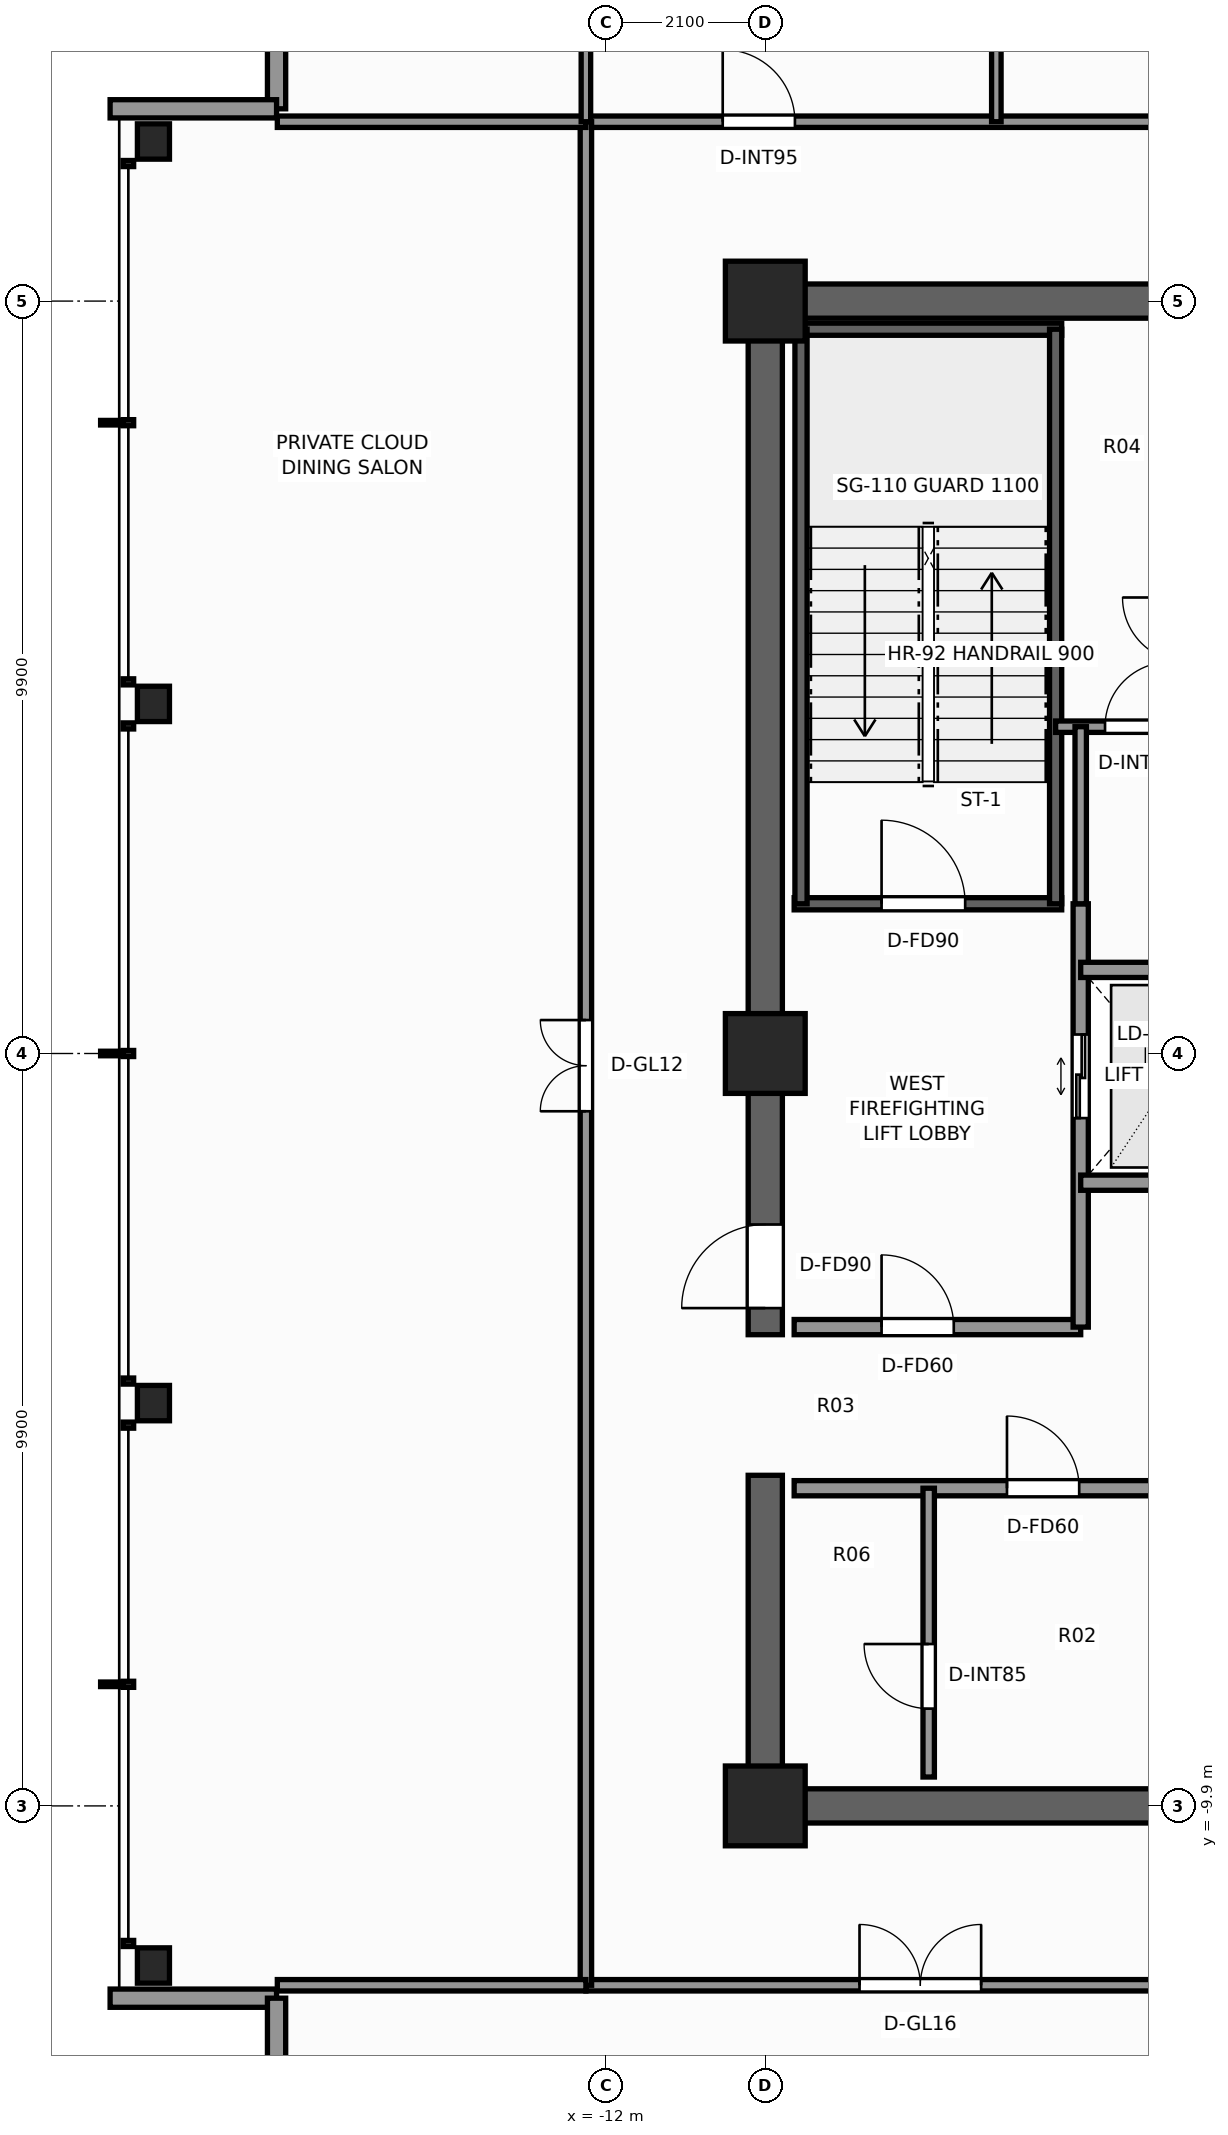
"""IFC4 building model, lengths in metres.
Left out: names, types, materials, properties, quantities, classifications, styles, units other than length and angle.
Written with IfcOpenShell. Run it as: python <this file> out.ifc"""

import sys

from ifc_helpers import new_model, si_unit, direction, frame, frame_2d, origin, origin_2d, place, context, subcontext, project, spatial, rectangle, i_section, extrude, element, fill, save


model = new_model("IFC4")
c1 = context("Model", 3, precision=1e-05, world=origin(), true_north=direction((0.0, 1.0)))
c2 = subcontext(c1, "Body", "Model", "MODEL_VIEW")
j1 = project(units=[si_unit("LENGTHUNIT", "METRE"), si_unit("PLANEANGLEUNIT", "RADIAN")], contexts=[c1])
p1 = place(None, origin())
s1 = spatial("IfcSite", under=j1, at=p1, CompositionType="ELEMENT")
p2 = place(p1, origin())
s2 = spatial("IfcBuilding", under=s1, at=p2, CompositionType="ELEMENT")
p3 = place(p2, frame((0.0, 0.0, 258.4)))
s3 = spatial("IfcBuildingStorey", under=s2, at=p3, CompositionType="ELEMENT", Elevation=258.4)
p4 = place(p3, frame((-3.54, -9.9, 0.0), z_axis=(0.0, 0.0, 1.0), x_axis=(-1.0, 0.0, 0.0)))
e1 = element("IfcWall", 1, at=p4, inside=s3, PredefinedType="SHEAR", context=c2, shape_type="SweptSolid", body=[
    extrude(rectangle(XDim=6.585, YDim=0.45, at=frame_2d((3.292, 0.0))), origin(), (0.0, 0.0, 1.0), 4.4),
])
p5 = place(p3, frame((-10.125, 9.9, 0.0), z_axis=(0.0, 0.0, 1.0), x_axis=(1.0, 0.0, 0.0)))
e2 = element("IfcWall", 2, at=p5, inside=s3, PredefinedType="SHEAR", context=c2, shape_type="SweptSolid", body=[
    extrude(rectangle(XDim=14.545, YDim=0.45, at=frame_2d((7.272, 0.0))), origin(), (0.0, 0.0, 1.0), 4.4),
])
p6 = place(p3, frame((-9.9, -9.675, 0.0), z_axis=(0.0, 0.0, 1.0), x_axis=(0.0, 1.0, 0.0)))
e3 = element("IfcWall", 3, at=p6, inside=s3, PredefinedType="SHEAR", context=c2, shape_type="SweptSolid", body=[
    extrude(rectangle(XDim=4.125, YDim=0.45, at=frame_2d((2.062, 0.0))), origin(), (0.0, 0.0, 1.0), 4.4),
])
p7 = place(p3, frame((-9.9, -3.7, 0.0), z_axis=(0.0, 0.0, 1.0), x_axis=(0.0, 1.0, 0.0)))
e4 = element("IfcWall", 4, at=p7, inside=s3, PredefinedType="SHEAR", context=c2, shape_type="SweptSolid", body=[
    extrude(rectangle(XDim=13.375, YDim=0.45, at=frame_2d((6.688, 0.0))), origin(), (0.0, 0.0, 1.0), 4.4),
])
p8 = place(p7, frame((0.35, 0.0, 0.0)))
e5 = element("IfcOpeningElement", 5, at=p8, cuts=e4, PredefinedType="OPENING", context=c2, shape_type="SweptSolid", body=[
    extrude(rectangle(XDim=1.1, YDim=2.2, at=frame_2d((0.55, 1.1))), frame((0.0, 0.235, 0.0), z_axis=(0.0, -1.0, 0.0), x_axis=(1.0, 0.0, 0.0)), (0.0, 0.0, 1.0), 0.47),
])
for number, where, z_axis, x_axis in (
    (6, (-9.9, -9.9, 0.0), (0.0, 0.0, 1.0), (1.0, 0.0, 0.0)),
    (7, (-9.9, 9.9, 0.0), (0.0, 0.0, 1.0), (1.0, 0.0, 0.0)),
    (8, (-9.9, 0.0, 0.0), (0.0, 0.0, 1.0), (1.0, 0.0, 0.0)),
):
    element("IfcColumn", number, at=place(p3, frame(where, z_axis=z_axis, x_axis=x_axis)), inside=s3, PredefinedType="COLUMN", context=c2, shape_type="SweptSolid", body=[
        extrude(rectangle(XDim=1.05, YDim=1.05, at=origin_2d()), origin(), (0.0, 0.0, 1.0), 4.4),
    ])
for number, where, z_axis, x_axis in (
    (9, (-17.95, -12.0, 0.0), (0.0, 0.0, 1.0), (1.0, 0.0, 0.0)),
    (10, (-17.95, -4.6, 0.0), (0.0, 0.0, 1.0), (1.0, 0.0, 0.0)),
    (11, (-17.95, 4.6, 0.0), (0.0, 0.0, 1.0), (1.0, 0.0, 0.0)),
    (12, (-17.95, 12.0, 0.0), (0.0, 0.0, 1.0), (1.0, 0.0, 0.0)),
):
    element("IfcColumn", number, at=place(p3, frame(where, z_axis=z_axis, x_axis=x_axis)), inside=s3, PredefinedType="COLUMN", context=c2, shape_type="SweptSolid", body=[
        extrude(i_section(OverallWidth=0.422, OverallDepth=0.465, WebThickness=0.045, FlangeThickness=0.073, FilletRadius=0.025, at=origin_2d()), origin(), (0.0, 0.0, 1.0), 4.4),
    ])
p9 = place(p3, frame((-16.33, 12.43, 0.0), z_axis=(0.0, 0.0, 1.0), x_axis=(0.0, 1.0, 0.0)))
e13 = element("IfcWall", 13, at=p9, inside=s3, PredefinedType="STANDARD", context=c2, shape_type="SweptSolid", body=[
    extrude(rectangle(XDim=2.19, YDim=0.24, at=frame_2d((1.095, 0.0))), origin(), (0.0, 0.0, 1.0), 3.503),
])
for number, where, z_axis, x_axis in (
    (14, (-18.52, 12.43, 0.0), (0.0, 0.0, 1.0), (1.0, 0.0, 0.0)),
    (15, (-16.33, -12.43, 0.0), (0.0, 0.0, 1.0), (-1.0, 0.0, 0.0)),
):
    element("IfcWall", number, at=place(p3, frame(where, z_axis=z_axis, x_axis=x_axis)), inside=s3, PredefinedType="STANDARD", context=c2, shape_type="SweptSolid", body=[
        extrude(rectangle(XDim=2.19, YDim=0.24, at=frame_2d((1.095, 0.0))), origin(), (0.0, 0.0, 1.0), 3.503),
    ])
p10 = place(p3, frame((-16.33, -14.62, 0.0), z_axis=(0.0, 0.0, 1.0), x_axis=(0.0, 1.0, 0.0)))
e16 = element("IfcWall", 16, at=p10, inside=s3, PredefinedType="STANDARD", context=c2, shape_type="SweptSolid", body=[
    extrude(rectangle(XDim=2.19, YDim=0.24, at=frame_2d((1.095, 0.0))), origin(), (0.0, 0.0, 1.0), 3.503),
])
p11 = place(p3, frame((-9.52, 1.97, 0.0), z_axis=(0.0, 0.0, 1.0), x_axis=(1.0, 0.0, 0.0)))
e17 = element("IfcWall", 17, at=p11, inside=s3, PredefinedType="SHEAR", context=c2, shape_type="SweptSolid", body=[
    extrude(rectangle(XDim=3.52, YDim=0.16, at=frame_2d((1.76, 0.0))), origin(), (0.0, 0.0, 1.0), 4.4),
])
p12 = place(p11, frame((1.15, 0.0, 0.0)))
e18 = element("IfcOpeningElement", 18, at=p12, cuts=e17, PredefinedType="OPENING", context=c2, shape_type="SweptSolid", body=[
    extrude(rectangle(XDim=1.1, YDim=2.2, at=frame_2d((0.55, 1.1))), frame((0.0, 0.09, 0.0), z_axis=(0.0, -1.0, 0.0), x_axis=(1.0, 0.0, 0.0)), (0.0, 0.0, 1.0), 0.18),
])
p13 = place(p3, frame((-9.52, 9.53, 0.0), z_axis=(0.0, 0.0, 1.0), x_axis=(1.0, 0.0, 0.0)))
e19 = element("IfcWall", 19, at=p13, inside=s3, PredefinedType="SHEAR", context=c2, shape_type="SweptSolid", body=[
    extrude(rectangle(XDim=3.52, YDim=0.16, at=frame_2d((1.76, 0.0))), origin(), (0.0, 0.0, 1.0), 4.4),
])
for number, where, z_axis, x_axis in (
    (20, (-9.43, 1.97, 0.0), (0.0, 0.0, 1.0), (0.0, 1.0, 0.0)),
    (21, (-6.08, 1.97, 0.0), (0.0, 0.0, 1.0), (0.0, 1.0, 0.0)),
):
    element("IfcWall", number, at=place(p3, frame(where, z_axis=z_axis, x_axis=x_axis)), inside=s3, PredefinedType="SHEAR", context=c2, shape_type="SweptSolid", body=[
        extrude(rectangle(XDim=7.56, YDim=0.16, at=frame_2d((3.78, 0.0))), origin(), (0.0, 0.0, 1.0), 4.4),
    ])
p14 = place(p3, frame((-9.52, -3.6, 0.0), z_axis=(0.0, 0.0, 1.0), x_axis=(1.0, 0.0, 0.0)))
e22 = element("IfcWall", 22, at=p14, inside=s3, PredefinedType="SOLIDWALL", context=c2, shape_type="SweptSolid", body=[
    extrude(rectangle(XDim=3.77, YDim=0.2, at=frame_2d((1.885, 0.0))), origin(), (0.0, 0.0, 1.0), 4.12),
])
p15 = place(p14, frame((1.15, 0.0, 0.0)))
e23 = element("IfcOpeningElement", 23, at=p15, cuts=e22, PredefinedType="OPENING", context=c2, shape_type="SweptSolid", body=[
    extrude(rectangle(XDim=0.95, YDim=2.06, at=frame_2d((0.475, 1.03))), frame((0.0, 0.11, 0.0), z_axis=(0.0, -1.0, 0.0), x_axis=(1.0, 0.0, 0.0)), (0.0, 0.0, 1.0), 0.22),
])
p16 = place(p3, frame((-5.75, -3.6, 0.0), z_axis=(0.0, 0.0, 1.0), x_axis=(0.0, 1.0, 0.0)))
e24 = element("IfcWall", 24, at=p16, inside=s3, PredefinedType="SOLIDWALL", context=c2, shape_type="SweptSolid", body=[
    extrude(rectangle(XDim=5.57, YDim=0.2, at=frame_2d((2.785, 0.0))), origin(), (0.0, 0.0, 1.0), 4.12),
])
p17 = place(p16, frame((2.75, 0.0, 0.0)))
e25 = element("IfcOpeningElement", 25, at=p17, cuts=e24, PredefinedType="OPENING", context=c2, shape_type="SweptSolid", body=[
    extrude(rectangle(XDim=1.1, YDim=2.2, at=frame_2d((0.55, 1.1))), frame((0.0, 0.11, 0.0), z_axis=(0.0, -1.0, 0.0), x_axis=(1.0, 0.0, 0.0)), (0.0, 0.0, 1.0), 0.22),
])
for number, where, z_axis, x_axis in (
    (26, (-5.75, -1.7, 0.0), (0.0, 0.0, 1.0), (1.0, 0.0, 0.0)),
    (27, (-5.75, 1.1, 0.0), (0.0, 0.0, 1.0), (1.0, 0.0, 0.0)),
):
    element("IfcWall", number, at=place(p3, frame(where, z_axis=z_axis, x_axis=x_axis)), inside=s3, PredefinedType="SOLIDWALL", context=c2, shape_type="SweptSolid", body=[
        extrude(rectangle(XDim=2.4, YDim=0.2, at=frame_2d((1.2, 0.0))), origin(), (0.0, 0.0, 1.0), 4.12),
    ])
p18 = place(p3, frame((-6.08, 4.3, 0.0), z_axis=(0.0, 0.0, 1.0), x_axis=(1.0, 0.0, 0.0)))
e28 = element("IfcWall", 28, at=p18, inside=s3, PredefinedType="PARTITIONING", context=c2, shape_type="SweptSolid", body=[
    extrude(rectangle(XDim=6.3, YDim=0.15, at=frame_2d((3.15, 0.0))), origin(), (0.0, 0.0, 1.0), 4.12),
])
p19 = place(p18, frame((0.65, 0.0, 0.0)))
e29 = element("IfcOpeningElement", 29, at=p19, cuts=e28, PredefinedType="OPENING", context=c2, shape_type="SweptSolid", body=[
    extrude(rectangle(XDim=0.85, YDim=2.03, at=frame_2d((0.425, 1.015))), frame((0.0, 0.085, 0.0), z_axis=(0.0, -1.0, 0.0), x_axis=(1.0, 0.0, 0.0)), (0.0, 0.0, 1.0), 0.17),
])
p20 = place(p3, frame((-9.52, -5.72, 0.0), z_axis=(0.0, 0.0, 1.0), x_axis=(1.0, 0.0, 0.0)))
e30 = element("IfcWall", 30, at=p20, inside=s3, PredefinedType="SOLIDWALL", context=c2, shape_type="SweptSolid", body=[
    extrude(rectangle(XDim=5.66, YDim=0.2, at=frame_2d((2.83, 0.0))), origin(), (0.0, 0.0, 1.0), 4.12),
])
p21 = place(p20, frame((2.8, 0.0, 0.0)))
e31 = element("IfcOpeningElement", 31, at=p21, cuts=e30, PredefinedType="OPENING", context=c2, shape_type="SweptSolid", body=[
    extrude(rectangle(XDim=0.95, YDim=2.06, at=frame_2d((0.475, 1.03))), frame((0.0, 0.11, 0.0), z_axis=(0.0, -1.0, 0.0), x_axis=(1.0, 0.0, 0.0)), (0.0, 0.0, 1.0), 0.22),
])
p22 = place(p3, frame((-7.75, -9.52, 0.0), z_axis=(0.0, 0.0, 1.0), x_axis=(0.0, 1.0, 0.0)))
e32 = element("IfcWall", 32, at=p22, inside=s3, PredefinedType="PARTITIONING", context=c2, shape_type="SweptSolid", body=[
    extrude(rectangle(XDim=3.8, YDim=0.15, at=frame_2d((1.9, 0.0))), origin(), (0.0, 0.0, 1.0), 4.12),
])
p23 = place(p22, frame((0.9, 0.0, 0.0)))
e33 = element("IfcOpeningElement", 33, at=p23, cuts=e32, PredefinedType="OPENING", context=c2, shape_type="SweptSolid", body=[
    extrude(rectangle(XDim=0.85, YDim=2.03, at=frame_2d((0.425, 1.015))), frame((0.0, 0.085, 0.0), z_axis=(0.0, -1.0, 0.0), x_axis=(1.0, 0.0, 0.0)), (0.0, 0.0, 1.0), 0.17),
])
p24 = place(p3, frame((-5.75, 1.97, 0.0), z_axis=(0.0, 0.0, 1.0), x_axis=(0.0, 1.0, 0.0)))
e34 = element("IfcWall", 34, at=p24, inside=s3, PredefinedType="PARTITIONING", context=c2, shape_type="SweptSolid", body=[
    extrude(rectangle(XDim=2.33, YDim=0.15, at=frame_2d((1.165, 0.0))), origin(), (0.0, 0.0, 1.0), 4.12),
])
p25 = place(p3, frame((-12.26, -12.26, 0.0), z_axis=(0.0, 0.0, 1.0), x_axis=(1.0, 0.0, 0.0)))
e35 = element("IfcWall", 35, at=p25, inside=s3, PredefinedType="PARTITIONING", context=c2, shape_type="SweptSolid", body=[
    extrude(rectangle(XDim=24.52, YDim=0.15, at=frame_2d((12.26, 0.0))), origin(), (0.0, 0.0, 1.0), 3.409),
])
p26 = place(p25, frame((3.6, 0.0, 0.0)))
e36 = element("IfcOpeningElement", 36, at=p26, cuts=e35, PredefinedType="OPENING", context=c2, shape_type="SweptSolid", body=[
    extrude(rectangle(XDim=1.6, YDim=2.3, at=frame_2d((0.8, 1.15))), frame((0.0, 0.085, 0.0), z_axis=(0.0, -1.0, 0.0), x_axis=(1.0, 0.0, 0.0)), (0.0, 0.0, 1.0), 0.17),
])
p27 = place(p25, frame((11.26, 0.0, 0.0)))
e37 = element("IfcOpeningElement", 37, at=p27, cuts=e35, PredefinedType="OPENING", context=c2, shape_type="SweptSolid", body=[
    extrude(rectangle(XDim=1.2, YDim=2.2, at=frame_2d((0.6, 1.1))), frame((0.0, 0.085, 0.0), z_axis=(0.0, -1.0, 0.0), x_axis=(1.0, 0.0, 0.0)), (0.0, 0.0, 1.0), 0.17),
])
p28 = place(p3, frame((-12.26, 12.26, 0.0), z_axis=(0.0, 0.0, 1.0), x_axis=(1.0, 0.0, 0.0)))
e38 = element("IfcWall", 38, at=p28, inside=s3, PredefinedType="PARTITIONING", context=c2, shape_type="SweptSolid", body=[
    extrude(rectangle(XDim=24.52, YDim=0.15, at=frame_2d((12.26, 0.0))), origin(), (0.0, 0.0, 1.0), 3.409),
])
p29 = place(p28, frame((1.8, 0.0, 0.0)))
e39 = element("IfcOpeningElement", 39, at=p29, cuts=e38, PredefinedType="OPENING", context=c2, shape_type="SweptSolid", body=[
    extrude(rectangle(XDim=0.95, YDim=2.06, at=frame_2d((0.475, 1.03))), frame((0.0, 0.085, 0.0), z_axis=(0.0, -1.0, 0.0), x_axis=(1.0, 0.0, 0.0)), (0.0, 0.0, 1.0), 0.17),
])
p30 = place(p28, frame((10.5, 0.0, 0.0)))
e40 = element("IfcOpeningElement", 40, at=p30, cuts=e38, PredefinedType="OPENING", context=c2, shape_type="SweptSolid", body=[
    extrude(rectangle(XDim=1.6, YDim=2.3, at=frame_2d((0.8, 1.15))), frame((0.0, 0.085, 0.0), z_axis=(0.0, -1.0, 0.0), x_axis=(1.0, 0.0, 0.0)), (0.0, 0.0, 1.0), 0.17),
])
p31 = place(p3, frame((-12.26, -12.26, 0.0), z_axis=(0.0, 0.0, 1.0), x_axis=(0.0, 1.0, 0.0)))
e41 = element("IfcWall", 41, at=p31, inside=s3, PredefinedType="PARTITIONING", context=c2, shape_type="SweptSolid", body=[
    extrude(rectangle(XDim=24.52, YDim=0.15, at=frame_2d((12.26, 0.0))), origin(), (0.0, 0.0, 1.0), 3.409),
])
p32 = place(p31, frame((11.5, 0.0, 0.0)))
e42 = element("IfcOpeningElement", 42, at=p32, cuts=e41, PredefinedType="OPENING", context=c2, shape_type="SweptSolid", body=[
    extrude(rectangle(XDim=1.2, YDim=2.2, at=frame_2d((0.6, 1.1))), frame((0.0, 0.085, 0.0), z_axis=(0.0, -1.0, 0.0), x_axis=(1.0, 0.0, 0.0)), (0.0, 0.0, 1.0), 0.17),
])
for number, where, z_axis, x_axis in (
    (43, (-16.32, -12.26, 0.0), (0.0, 0.0, 1.0), (1.0, 0.0, 0.0)),
    (44, (-16.32, 12.26, 0.0), (0.0, 0.0, 1.0), (1.0, 0.0, 0.0)),
):
    element("IfcWall", number, at=place(p3, frame(where, z_axis=z_axis, x_axis=x_axis)), inside=s3, PredefinedType="PARTITIONING", context=c2, shape_type="SweptSolid", body=[
        extrude(rectangle(XDim=4.06, YDim=0.15, at=frame_2d((2.03, 0.0))), origin(), (0.0, 0.0, 1.0), 4.12),
    ])
for number, where, z_axis, x_axis in (
    (45, (-12.26, 12.26, 0.0), (0.0, 0.0, 1.0), (0.0, 1.0, 0.0)),
    (46, (-6.86, 12.26, 0.0), (0.0, 0.0, 1.0), (0.0, 1.0, 0.0)),
):
    element("IfcWall", number, at=place(p3, frame(where, z_axis=z_axis, x_axis=x_axis)), inside=s3, PredefinedType="PARTITIONING", context=c2, shape_type="SweptSolid", body=[
        extrude(rectangle(XDim=4.04, YDim=0.125, at=frame_2d((2.02, 0.0))), origin(), (0.0, 0.0, 1.0), 4.12),
    ])
p33 = place(p12, origin())
e47 = element("IfcDoor", 47, at=p33, inside=s3, OperationType="SINGLE_SWING_LEFT", PredefinedType="DOOR", context=c2, shape_type="SweptSolid", body=[
    extrude(rectangle(XDim=1.1, YDim=2.2, at=frame_2d((0.55, 1.1))), frame((0.0, 0.025, 0.0), z_axis=(0.0, -1.0, 0.0), x_axis=(1.0, 0.0, 0.0)), (0.0, 0.0, 1.0), 0.05),
])
fill(e18, e47)
p34 = place(p8, origin())
e48 = element("IfcDoor", 48, at=p34, inside=s3, OperationType="SINGLE_SWING_LEFT", PredefinedType="DOOR", context=c2, shape_type="SweptSolid", body=[
    extrude(rectangle(XDim=1.1, YDim=2.2, at=frame_2d((0.55, 1.1))), frame((0.0, 0.025, 0.0), z_axis=(0.0, -1.0, 0.0), x_axis=(1.0, 0.0, 0.0)), (0.0, 0.0, 1.0), 0.05),
])
fill(e5, e48)
p35 = place(p17, origin())
e49 = element("IfcDoor", 49, at=p35, inside=s3, OperationType="DOUBLE_DOOR_SLIDING", PredefinedType="DOOR", context=c2, shape_type="SweptSolid", body=[
    extrude(rectangle(XDim=1.1, YDim=2.2, at=frame_2d((0.55, 1.1))), frame((0.0, 0.025, 0.0), z_axis=(0.0, -1.0, 0.0), x_axis=(1.0, 0.0, 0.0)), (0.0, 0.0, 1.0), 0.05),
])
fill(e25, e49)
p36 = place(p21, origin())
e50 = element("IfcDoor", 50, at=p36, inside=s3, OperationType="SINGLE_SWING_LEFT", PredefinedType="DOOR", context=c2, shape_type="SweptSolid", body=[
    extrude(rectangle(XDim=0.95, YDim=2.06, at=frame_2d((0.475, 1.03))), frame((0.0, 0.025, 0.0), z_axis=(0.0, -1.0, 0.0), x_axis=(1.0, 0.0, 0.0)), (0.0, 0.0, 1.0), 0.05),
])
fill(e31, e50)
p37 = place(p23, origin())
e51 = element("IfcDoor", 51, at=p37, inside=s3, OperationType="SINGLE_SWING_RIGHT", PredefinedType="DOOR", context=c2, shape_type="SweptSolid", body=[
    extrude(rectangle(XDim=0.85, YDim=2.03, at=frame_2d((0.425, 1.015))), frame((0.0, 0.025, 0.0), z_axis=(0.0, -1.0, 0.0), x_axis=(1.0, 0.0, 0.0)), (0.0, 0.0, 1.0), 0.05),
])
fill(e33, e51)
p38 = place(p15, origin())
e52 = element("IfcDoor", 52, at=p38, inside=s3, OperationType="SINGLE_SWING_LEFT", PredefinedType="DOOR", context=c2, shape_type="SweptSolid", body=[
    extrude(rectangle(XDim=0.95, YDim=2.06, at=frame_2d((0.475, 1.03))), frame((0.0, 0.025, 0.0), z_axis=(0.0, -1.0, 0.0), x_axis=(1.0, 0.0, 0.0)), (0.0, 0.0, 1.0), 0.05),
])
fill(e23, e52)
p39 = place(p19, origin())
e53 = element("IfcDoor", 53, at=p39, inside=s3, OperationType="SINGLE_SWING_RIGHT", PredefinedType="DOOR", context=c2, shape_type="SweptSolid", body=[
    extrude(rectangle(XDim=0.85, YDim=2.03, at=frame_2d((0.425, 1.015))), frame((0.0, 0.025, 0.0), z_axis=(0.0, -1.0, 0.0), x_axis=(1.0, 0.0, 0.0)), (0.0, 0.0, 1.0), 0.05),
])
fill(e29, e53)
p40 = place(p26, origin())
e54 = element("IfcDoor", 54, at=p40, inside=s3, OperationType="DOUBLE_DOOR_SINGLE_SWING", PredefinedType="DOOR", context=c2, shape_type="SweptSolid", body=[
    extrude(rectangle(XDim=1.6, YDim=2.3, at=frame_2d((0.8, 1.15))), frame((0.0, 0.025, 0.0), z_axis=(0.0, -1.0, 0.0), x_axis=(1.0, 0.0, 0.0)), (0.0, 0.0, 1.0), 0.05),
])
fill(e36, e54)
p41 = place(p32, origin())
e55 = element("IfcDoor", 55, at=p41, inside=s3, OperationType="DOUBLE_DOOR_SINGLE_SWING", PredefinedType="DOOR", context=c2, shape_type="SweptSolid", body=[
    extrude(rectangle(XDim=1.2, YDim=2.2, at=frame_2d((0.6, 1.1))), frame((0.0, 0.025, 0.0), z_axis=(0.0, -1.0, 0.0), x_axis=(1.0, 0.0, 0.0)), (0.0, 0.0, 1.0), 0.05),
])
fill(e42, e55)
p42 = place(p29, origin())
e56 = element("IfcDoor", 56, at=p42, inside=s3, OperationType="SINGLE_SWING_LEFT", PredefinedType="DOOR", context=c2, shape_type="SweptSolid", body=[
    extrude(rectangle(XDim=0.95, YDim=2.06, at=frame_2d((0.475, 1.03))), frame((0.0, 0.025, 0.0), z_axis=(0.0, -1.0, 0.0), x_axis=(1.0, 0.0, 0.0)), (0.0, 0.0, 1.0), 0.05),
])
fill(e39, e56)
save(model, sys.argv[1])
